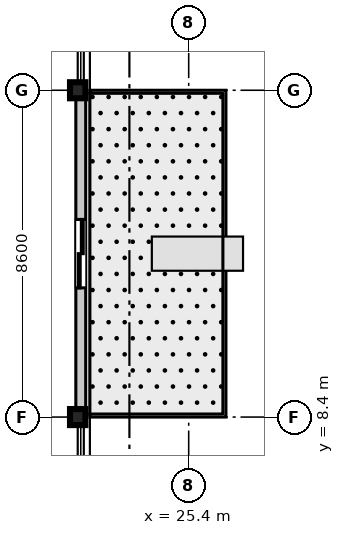
"""IFC4 building model, lengths in metres.
Left out: names, types, materials, properties, quantities, classifications, styles, units other than length and angle.
Written with IfcOpenShell. Run it as: python <this file> out.ifc"""

import sys

from ifc_helpers import new_model, si_unit, direction, frame, frame_2d, origin, origin_2d, place, context, subcontext, project, spatial, rectangle, i_section, extrude, source, transform, mapped, element, fill, save


model = new_model("IFC4")
c1 = context("Model", 3, precision=1e-05, world=origin(), true_north=direction((0.0, 1.0)))
c2 = subcontext(c1, "Body", "Model", "MODEL_VIEW")
j1 = project(units=[si_unit("LENGTHUNIT", "METRE"), si_unit("PLANEANGLEUNIT", "RADIAN")], contexts=[c1])
p1 = place(None, origin())
s1 = spatial("IfcSite", under=j1, at=p1, CompositionType="ELEMENT")
p2 = place(p1, origin())
s2 = spatial("IfcBuilding", under=s1, at=p2, CompositionType="ELEMENT")
p3 = place(p2, frame((0.0, 0.0, 178.2)))
s3 = spatial("IfcBuildingStorey", under=s2, at=p3, CompositionType="ELEMENT", Elevation=178.2)
m1 = source(origin(), c2, "Body", "SweptSolid", [
    extrude(i_section(OverallWidth=0.406, OverallDepth=0.422, WebThickness=0.019, FlangeThickness=0.03, at=origin_2d()), origin(), (0.0, 0.0, 1.0), 3.605),
])
for number, where, z_axis, x_axis in (
    (1, (22.48, 8.4, 0.0), (0.0, 0.0, 1.0), (1.0, 0.0, 0.0)),
    (2, (22.48, 17.0, 0.0), (0.0, 0.0, 1.0), (1.0, 0.0, 0.0)),
):
    element("IfcColumn", number, at=place(p3, frame(where, z_axis=z_axis, x_axis=x_axis)), inside=s3, PredefinedType="COLUMN", context=c2, shape_type="MappedRepresentation", body=[
        mapped(m1, transform((0.0, 0.0, 0.0), scale=1.0)),
    ])
m2 = source(origin(), c2, "Body", "SweptSolid", [
    extrude(rectangle(XDim=8.6, YDim=0.26, at=frame_2d((4.3, 0.0))), origin(), (0.0, 0.0, 1.0), 2.87),
])
p4 = place(p3, frame((22.56, 8.4, 0.0), z_axis=(0.0, 0.0, 1.0), x_axis=(0.0, 1.0, 0.0)))
e3 = element("IfcWall", 3, at=p4, inside=s3, PredefinedType="STANDARD", context=c2, shape_type="MappedRepresentation", body=[
    mapped(m2, transform((0.0, 0.0, 0.0), scale=1.0)),
])
p5 = place(p4, frame((3.4, 0.0, 0.0)))
e4 = element("IfcOpeningElement", 4, at=p5, cuts=e3, PredefinedType="OPENING", context=c2, shape_type="SweptSolid", body=[
    extrude(rectangle(XDim=1.8, YDim=2.25, at=frame_2d((0.9, 1.125))), frame((0.0, 0.14, 0.0), z_axis=(0.0, -1.0, 0.0), x_axis=(1.0, 0.0, 0.0)), (0.0, 0.0, 1.0), 0.28),
])
m3 = source(origin(), c2, "Body", "SweptSolid", [
    extrude(rectangle(XDim=1.8, YDim=2.25, at=frame_2d((0.9, 1.125))), frame((0.0, 0.025, 0.0), z_axis=(0.0, -1.0, 0.0), x_axis=(1.0, 0.0, 0.0)), (0.0, 0.0, 1.0), 0.05),
])
p6 = place(p5, frame((1.8, 0.0, 0.0), z_axis=(0.0, 0.0, 1.0), x_axis=(-1.0, 0.0, 0.0)))
e5 = element("IfcDoor", 5, at=p6, inside=s3, OperationType="DOUBLE_DOOR_SLIDING", PredefinedType="DOOR", context=c2, shape_type="MappedRepresentation", body=[
    mapped(m3, transform((0.0, 0.0, 0.0), scale=1.0)),
])
fill(e4, e5)
save(model, sys.argv[1])
